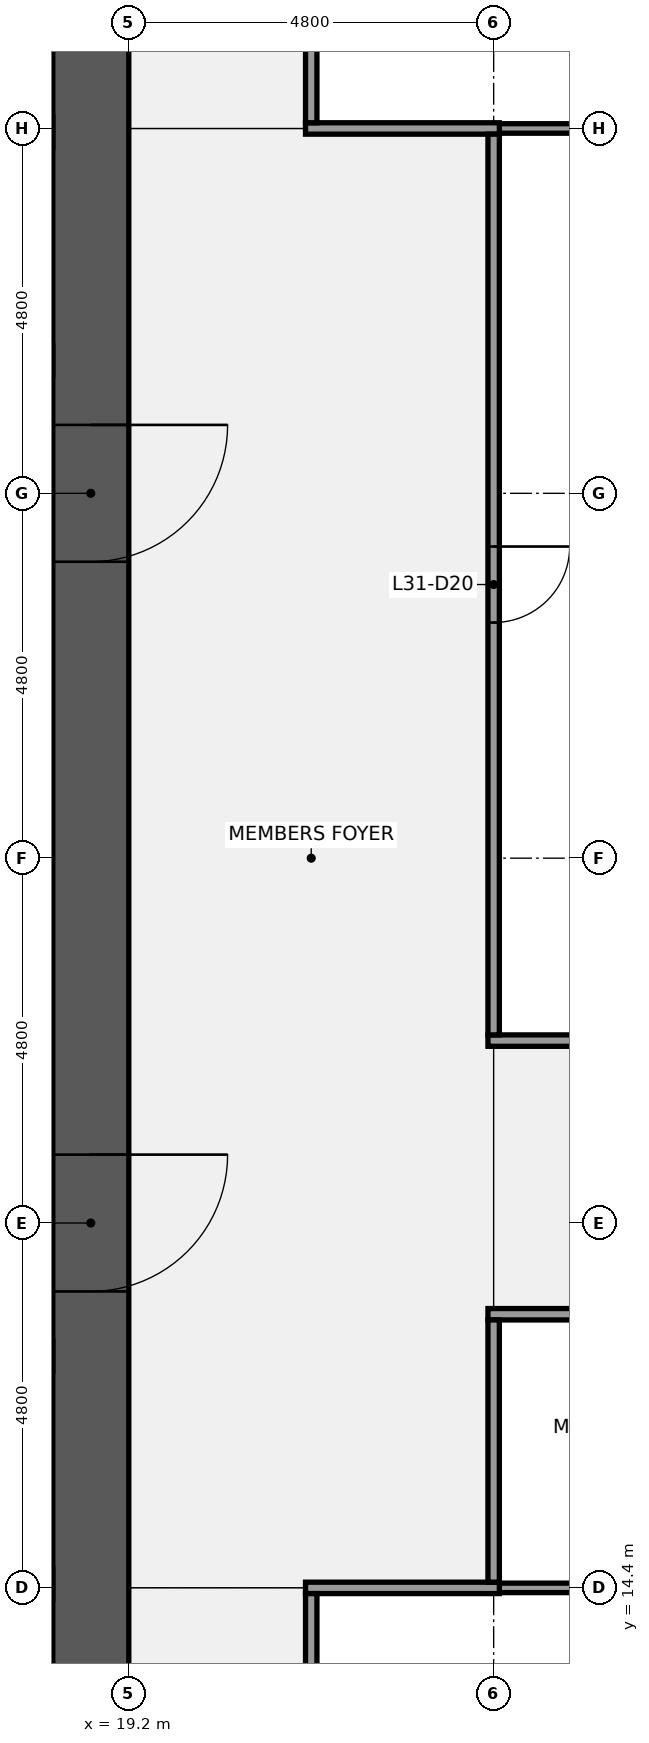
"""IFC4 building model, lengths in metres.
Left out: names, types, materials, properties, quantities, classifications, styles, units other than length and angle.
Written with IfcOpenShell. Run it as: python <this file> out.ifc"""

import sys

from ifc_helpers import new_model, si_unit, direction, frame, frame_2d, origin, place, context, subcontext, project, spatial, rectangle, extrude, element, fill, save


model = new_model("IFC4")
c1 = context("Model", 3, precision=1e-05, world=origin(), true_north=direction((0.0, 1.0)))
c2 = subcontext(c1, "Body", "Model", "MODEL_VIEW")
j1 = project(units=[si_unit("LENGTHUNIT", "METRE"), si_unit("PLANEANGLEUNIT", "RADIAN")], contexts=[c1])
p1 = place(None, origin())
s1 = spatial("IfcSite", under=j1, at=p1, CompositionType="ELEMENT")
p2 = place(p1, origin())
s2 = spatial("IfcBuilding", under=s1, at=p2, CompositionType="ELEMENT")
p3 = place(p2, frame((0.0, 0.0, 144.1)))
s3 = spatial("IfcBuildingStorey", under=s2, at=p3, CompositionType="ELEMENT", Elevation=144.1)
p4 = place(p3, frame((18.7, 38.4, 0.0), z_axis=(0.0, 0.0, 1.0), x_axis=(0.0, -1.0, 0.0)))
e1 = element("IfcWall", 1, at=p4, inside=s3, PredefinedType="SHEAR", context=c2, shape_type="SweptSolid", body=[
    extrude(rectangle(XDim=28.8, YDim=1.0, at=frame_2d((14.4, 0.0))), origin(), (0.0, 0.0, 1.0), 3.84),
])
p5 = place(p4, frame((18.3, 0.0, 0.0)))
e2 = element("IfcOpeningElement", 2, at=p5, cuts=e1, PredefinedType="OPENING", context=c2, shape_type="SweptSolid", body=[
    extrude(rectangle(XDim=1.8, YDim=2.1, at=frame_2d((0.9, 1.05))), frame((0.0, 0.51, 0.0), z_axis=(0.0, -1.0, 0.0), x_axis=(1.0, 0.0, 0.0)), (0.0, 0.0, 1.0), 1.02),
])
p6 = place(p4, frame((8.7, 0.0, 0.0)))
e3 = element("IfcOpeningElement", 3, at=p6, cuts=e1, PredefinedType="OPENING", context=c2, shape_type="SweptSolid", body=[
    extrude(rectangle(XDim=1.8, YDim=2.1, at=frame_2d((0.9, 1.05))), frame((0.0, 0.51, 0.0), z_axis=(0.0, -1.0, 0.0), x_axis=(1.0, 0.0, 0.0)), (0.0, 0.0, 1.0), 1.02),
])
p7 = place(p3, frame((1.0, 14.45, 0.0), z_axis=(0.0, 0.0, 1.0), x_axis=(1.0, 0.0, 0.0)))
e4 = element("IfcWall", 4, at=p7, inside=s3, PredefinedType="SHEAR", context=c2, shape_type="SweptSolid", body=[
    extrude(rectangle(XDim=17.2, YDim=0.4, at=frame_2d((8.6, 0.0))), origin(), (0.0, 0.0, 1.0), 3.84),
])
p8 = place(p3, frame((1.0, 17.45, 0.0), z_axis=(0.0, 0.0, 1.0), x_axis=(1.0, 0.0, 0.0)))
e5 = element("IfcWall", 5, at=p8, inside=s3, PredefinedType="SHEAR", context=c2, shape_type="SweptSolid", body=[
    extrude(rectangle(XDim=17.2, YDim=0.4, at=frame_2d((8.6, 0.0))), origin(), (0.0, 0.0, 1.0), 3.84),
])
p9 = place(p8, frame((0.762, 0.0, 0.0)))
e6 = element("IfcOpeningElement", 6, at=p9, cuts=e5, PredefinedType="OPENING", context=c2, shape_type="SweptSolid", body=[
    extrude(rectangle(XDim=1.0, YDim=2.1, at=frame_2d((0.5, 1.05))), frame((0.0, 0.21, 0.0), z_axis=(0.0, -1.0, 0.0), x_axis=(1.0, 0.0, 0.0)), (0.0, 0.0, 1.0), 0.42),
])
p10 = place(p8, frame((3.6, 0.0, 0.0)))
e7 = element("IfcOpeningElement", 7, at=p10, cuts=e5, PredefinedType="OPENING", context=c2, shape_type="SweptSolid", body=[
    extrude(rectangle(XDim=1.0, YDim=2.1, at=frame_2d((0.5, 1.05))), frame((0.0, 0.21, 0.0), z_axis=(0.0, -1.0, 0.0), x_axis=(1.0, 0.0, 0.0)), (0.0, 0.0, 1.0), 0.42),
])
p11 = place(p8, frame((6.6, 0.0, 0.0)))
e8 = element("IfcOpeningElement", 8, at=p11, cuts=e5, PredefinedType="OPENING", context=c2, shape_type="SweptSolid", body=[
    extrude(rectangle(XDim=1.0, YDim=2.1, at=frame_2d((0.5, 1.05))), frame((0.0, 0.21, 0.0), z_axis=(0.0, -1.0, 0.0), x_axis=(1.0, 0.0, 0.0)), (0.0, 0.0, 1.0), 0.42),
])
p12 = place(p8, frame((10.2, 0.0, 0.0)))
e9 = element("IfcOpeningElement", 9, at=p12, cuts=e5, PredefinedType="OPENING", context=c2, shape_type="SweptSolid", body=[
    extrude(rectangle(XDim=1.0, YDim=2.1, at=frame_2d((0.5, 1.05))), frame((0.0, 0.21, 0.0), z_axis=(0.0, -1.0, 0.0), x_axis=(1.0, 0.0, 0.0)), (0.0, 0.0, 1.0), 0.42),
])
p13 = place(p8, frame((14.538, 0.0, 0.0)))
e10 = element("IfcOpeningElement", 10, at=p13, cuts=e5, PredefinedType="OPENING", context=c2, shape_type="SweptSolid", body=[
    extrude(rectangle(XDim=1.0, YDim=2.1, at=frame_2d((0.5, 1.05))), frame((0.0, 0.21, 0.0), z_axis=(0.0, -1.0, 0.0), x_axis=(1.0, 0.0, 0.0)), (0.0, 0.0, 1.0), 0.42),
])
p14 = place(p3, frame((1.0, 30.55, 0.0), z_axis=(0.0, 0.0, 1.0), x_axis=(1.0, 0.0, 0.0)))
e11 = element("IfcWall", 11, at=p14, inside=s3, PredefinedType="SHEAR", context=c2, shape_type="SweptSolid", body=[
    extrude(rectangle(XDim=17.2, YDim=0.4, at=frame_2d((8.6, 0.0))), origin(), (0.0, 0.0, 1.0), 3.84),
])
p15 = place(p14, frame((1.663, 0.0, 0.0)))
e12 = element("IfcOpeningElement", 12, at=p15, cuts=e11, PredefinedType="OPENING", context=c2, shape_type="SweptSolid", body=[
    extrude(rectangle(XDim=1.0, YDim=2.1, at=frame_2d((0.5, 1.05))), frame((0.0, 0.21, 0.0), z_axis=(0.0, -1.0, 0.0), x_axis=(1.0, 0.0, 0.0)), (0.0, 0.0, 1.0), 0.42),
])
p16 = place(p14, frame((5.1, 0.0, 0.0)))
e13 = element("IfcOpeningElement", 13, at=p16, cuts=e11, PredefinedType="OPENING", context=c2, shape_type="SweptSolid", body=[
    extrude(rectangle(XDim=1.0, YDim=2.1, at=frame_2d((0.5, 1.05))), frame((0.0, 0.21, 0.0), z_axis=(0.0, -1.0, 0.0), x_axis=(1.0, 0.0, 0.0)), (0.0, 0.0, 1.0), 0.42),
])
p17 = place(p14, frame((9.3, 0.0, 0.0)))
e14 = element("IfcOpeningElement", 14, at=p17, cuts=e11, PredefinedType="OPENING", context=c2, shape_type="SweptSolid", body=[
    extrude(rectangle(XDim=1.0, YDim=2.1, at=frame_2d((0.5, 1.05))), frame((0.0, 0.21, 0.0), z_axis=(0.0, -1.0, 0.0), x_axis=(1.0, 0.0, 0.0)), (0.0, 0.0, 1.0), 0.42),
])
p18 = place(p14, frame((14.538, 0.0, 0.0)))
e15 = element("IfcOpeningElement", 15, at=p18, cuts=e11, PredefinedType="OPENING", context=c2, shape_type="SweptSolid", body=[
    extrude(rectangle(XDim=1.0, YDim=2.1, at=frame_2d((0.5, 1.05))), frame((0.0, 0.21, 0.0), z_axis=(0.0, -1.0, 0.0), x_axis=(1.0, 0.0, 0.0)), (0.0, 0.0, 1.0), 0.42),
])
p19 = place(p3, frame((1.0, 33.55, 0.0), z_axis=(0.0, 0.0, 1.0), x_axis=(1.0, 0.0, 0.0)))
e16 = element("IfcWall", 16, at=p19, inside=s3, PredefinedType="SHEAR", context=c2, shape_type="SweptSolid", body=[
    extrude(rectangle(XDim=17.2, YDim=0.4, at=frame_2d((8.6, 0.0))), origin(), (0.0, 0.0, 1.0), 3.84),
])
p20 = place(p3, frame((24.075, 14.4, 0.0), z_axis=(0.0, 0.0, 1.0), x_axis=(1.0, 0.0, 0.0)))
e17 = element("IfcWall", 17, at=p20, inside=s3, PredefinedType="PARTITIONING", context=c2, shape_type="SweptSolid", body=[
    extrude(rectangle(XDim=9.6, YDim=0.125, at=frame_2d((4.8, 0.0))), origin(), (0.0, 0.0, 1.0), 2.936),
])
p21 = place(p3, frame((21.525, 14.4, 0.0), z_axis=(0.0, 0.0, 1.0), x_axis=(1.0, 0.0, 0.0)))
e18 = element("IfcWall", 18, at=p21, inside=s3, PredefinedType="PARTITIONING", context=c2, shape_type="SweptSolid", body=[
    extrude(rectangle(XDim=2.55, YDim=0.15, at=frame_2d((1.275, 0.0))), origin(), (0.0, 0.0, 1.0), 2.936),
])
p22 = place(p3, frame((23.925, 18.0, 0.0), z_axis=(0.0, 0.0, 1.0), x_axis=(1.0, 0.0, 0.0)))
e19 = element("IfcWall", 19, at=p22, inside=s3, PredefinedType="PARTITIONING", context=c2, shape_type="SweptSolid", body=[
    extrude(rectangle(XDim=9.75, YDim=0.15, at=frame_2d((4.875, 0.0))), origin(), (0.0, 0.0, 1.0), 2.936),
])
p23 = place(p22, frame((1.375, 0.0, 0.0)))
e20 = element("IfcOpeningElement", 20, at=p23, cuts=e19, PredefinedType="OPENING", context=c2, shape_type="SweptSolid", body=[
    extrude(rectangle(XDim=1.0, YDim=2.1, at=frame_2d((0.5, 1.05))), frame((0.0, 0.085, 0.0), z_axis=(0.0, -1.0, 0.0), x_axis=(1.0, 0.0, 0.0)), (0.0, 0.0, 1.0), 0.17),
])
p24 = place(p22, frame((6.175, 0.0, 0.0)))
e21 = element("IfcOpeningElement", 21, at=p24, cuts=e19, PredefinedType="OPENING", context=c2, shape_type="SweptSolid", body=[
    extrude(rectangle(XDim=1.0, YDim=2.1, at=frame_2d((0.5, 1.05))), frame((0.0, 0.085, 0.0), z_axis=(0.0, -1.0, 0.0), x_axis=(1.0, 0.0, 0.0)), (0.0, 0.0, 1.0), 0.17),
])
p25 = place(p3, frame((23.925, 21.6, 0.0), z_axis=(0.0, 0.0, 1.0), x_axis=(1.0, 0.0, 0.0)))
e22 = element("IfcWall", 22, at=p25, inside=s3, PredefinedType="PARTITIONING", context=c2, shape_type="SweptSolid", body=[
    extrude(rectangle(XDim=9.75, YDim=0.15, at=frame_2d((4.875, 0.0))), origin(), (0.0, 0.0, 1.0), 2.936),
])
p26 = place(p3, frame((24.075, 33.6, 0.0), z_axis=(0.0, 0.0, 1.0), x_axis=(1.0, 0.0, 0.0)))
e23 = element("IfcWall", 23, at=p26, inside=s3, PredefinedType="PARTITIONING", context=c2, shape_type="SweptSolid", body=[
    extrude(rectangle(XDim=9.6, YDim=0.125, at=frame_2d((4.8, 0.0))), origin(), (0.0, 0.0, 1.0), 2.936),
])
p27 = place(p3, frame((21.525, 33.6, 0.0), z_axis=(0.0, 0.0, 1.0), x_axis=(1.0, 0.0, 0.0)))
e24 = element("IfcWall", 24, at=p27, inside=s3, PredefinedType="PARTITIONING", context=c2, shape_type="SweptSolid", body=[
    extrude(rectangle(XDim=2.55, YDim=0.15, at=frame_2d((1.275, 0.0))), origin(), (0.0, 0.0, 1.0), 2.936),
])
for number, where, z_axis, x_axis in (
    (25, (21.6, 9.675, 0.0), (0.0, 0.0, 1.0), (0.0, 1.0, 0.0)),
    (26, (21.6, 33.675, 0.0), (0.0, 0.0, 1.0), (0.0, 1.0, 0.0)),
):
    element("IfcWall", number, at=place(p3, frame(where, z_axis=z_axis, x_axis=x_axis)), inside=s3, PredefinedType="PARTITIONING", context=c2, shape_type="SweptSolid", body=[
        extrude(rectangle(XDim=4.65, YDim=0.15, at=frame_2d((2.325, 0.0))), origin(), (0.0, 0.0, 1.0), 2.936),
    ])
p28 = place(p3, frame((24.0, 14.475, 0.0), z_axis=(0.0, 0.0, 1.0), x_axis=(0.0, 1.0, 0.0)))
e27 = element("IfcWall", 27, at=p28, inside=s3, PredefinedType="PARTITIONING", context=c2, shape_type="SweptSolid", body=[
    extrude(rectangle(XDim=3.45, YDim=0.15, at=frame_2d((1.725, 0.0))), origin(), (0.0, 0.0, 1.0), 2.936),
])
p29 = place(p3, frame((24.0, 21.675, 0.0), z_axis=(0.0, 0.0, 1.0), x_axis=(0.0, 1.0, 0.0)))
e28 = element("IfcWall", 28, at=p29, inside=s3, PredefinedType="PARTITIONING", context=c2, shape_type="SweptSolid", body=[
    extrude(rectangle(XDim=11.85, YDim=0.15, at=frame_2d((5.925, 0.0))), origin(), (0.0, 0.0, 1.0), 2.936),
])
p30 = place(p29, frame((5.425, 0.0, 0.0)))
e29 = element("IfcOpeningElement", 29, at=p30, cuts=e28, PredefinedType="OPENING", context=c2, shape_type="SweptSolid", body=[
    extrude(rectangle(XDim=1.0, YDim=2.1, at=frame_2d((0.5, 1.05))), frame((0.0, 0.085, 0.0), z_axis=(0.0, -1.0, 0.0), x_axis=(1.0, 0.0, 0.0)), (0.0, 0.0, 1.0), 0.17),
])
p31 = place(p5, origin())
e30 = element("IfcDoor", 30, at=p31, inside=s3, OperationType="DOUBLE_DOOR_SINGLE_SWING", PredefinedType="DOOR", context=c2, shape_type="SweptSolid", body=[
    extrude(rectangle(XDim=1.8, YDim=2.1, at=frame_2d((0.9, 1.05))), frame((0.0, 0.025, 0.0), z_axis=(0.0, -1.0, 0.0), x_axis=(1.0, 0.0, 0.0)), (0.0, 0.0, 1.0), 0.05),
])
fill(e2, e30)
p32 = place(p6, origin())
e31 = element("IfcDoor", 31, at=p32, inside=s3, OperationType="DOUBLE_DOOR_SINGLE_SWING", PredefinedType="DOOR", context=c2, shape_type="SweptSolid", body=[
    extrude(rectangle(XDim=1.8, YDim=2.1, at=frame_2d((0.9, 1.05))), frame((0.0, 0.025, 0.0), z_axis=(0.0, -1.0, 0.0), x_axis=(1.0, 0.0, 0.0)), (0.0, 0.0, 1.0), 0.05),
])
fill(e3, e31)
p33 = place(p30, origin())
e32 = element("IfcDoor", 32, at=p33, inside=s3, OperationType="SINGLE_SWING_RIGHT", PredefinedType="DOOR", context=c2, shape_type="SweptSolid", body=[
    extrude(rectangle(XDim=1.0, YDim=2.1, at=frame_2d((0.5, 1.05))), frame((0.0, 0.025, 0.0), z_axis=(0.0, -1.0, 0.0), x_axis=(1.0, 0.0, 0.0)), (0.0, 0.0, 1.0), 0.05),
])
fill(e29, e32)
save(model, sys.argv[1])
